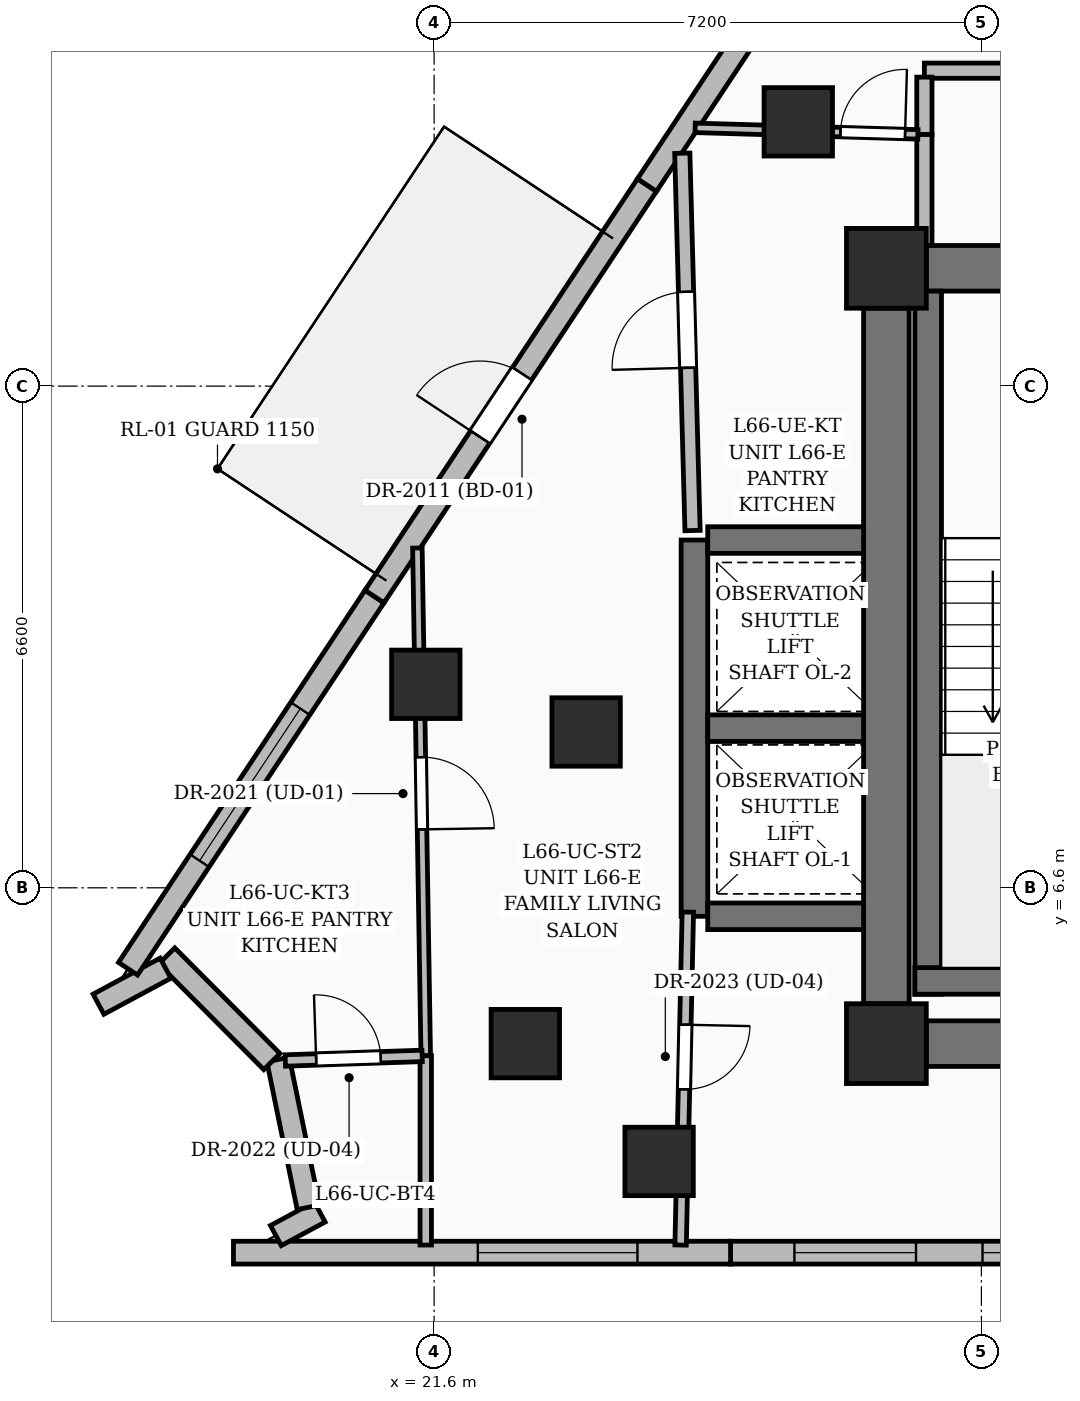
"""IFC4 building model, lengths in metres.
Left out: names, types, materials, properties, quantities, classifications, styles, units other than length and angle.
Written with IfcOpenShell. Run it as: python <this file> out.ifc"""

import sys

from ifc_helpers import new_model, si_unit, direction, frame, frame_2d, origin, origin_2d, place, context, subcontext, project, spatial, rectangle, extrude, element, fill, save


model = new_model("IFC4")
c1 = context("Model", 3, precision=1e-05, world=origin(), true_north=direction((0.0, 1.0)))
c2 = subcontext(c1, "Body", "Model", "MODEL_VIEW")
j1 = project(units=[si_unit("LENGTHUNIT", "METRE"), si_unit("PLANEANGLEUNIT", "RADIAN")], contexts=[c1])
p1 = place(None, origin())
s1 = spatial("IfcSite", under=j1, at=p1, CompositionType="ELEMENT")
p2 = place(p1, origin())
s2 = spatial("IfcBuilding", under=s1, at=p2, CompositionType="ELEMENT")
p3 = place(p2, frame((0.0, 0.0, 255.75)))
s3 = spatial("IfcBuildingStorey", under=s2, at=p3, CompositionType="ELEMENT", Elevation=255.75)
for number, where, z_axis, x_axis in (
    (1, (27.55, 4.55, 0.0), (0.0, 0.0, 1.0), (1.0, 0.0, 0.0)),
    (2, (27.55, 14.75, 0.0), (0.0, 0.0, 1.0), (1.0, 0.0, 0.0)),
):
    element("IfcColumn", number, at=place(p3, frame(where, z_axis=z_axis, x_axis=x_axis)), inside=s3, PredefinedType="COLUMN", context=c2, shape_type="SweptSolid", body=[
        extrude(rectangle(XDim=1.05, YDim=1.05, at=origin_2d()), origin(), (0.0, 0.0, 1.0), 3.75),
    ])
for number, where, z_axis, x_axis in (
    (3, (22.8, 4.55, 0.0), (0.0, 0.0, 1.0), (1.0, 0.0, 0.0)),
    (4, (23.6, 8.65, 0.0), (0.0, 0.0, 1.0), (1.0, 0.0, 0.0)),
):
    element("IfcColumn", number, at=place(p3, frame(where, z_axis=z_axis, x_axis=x_axis)), inside=s3, PredefinedType="COLUMN", context=c2, shape_type="SweptSolid", body=[
        extrude(rectangle(XDim=0.9, YDim=0.9, at=origin_2d()), origin(), (0.0, 0.0, 1.0), 3.75),
    ])
p4 = place(p3, frame((28.075, 4.55, 0.0), z_axis=(0.0, 0.0, 1.0), x_axis=(1.0, 0.0, 0.0)))
e5 = element("IfcWall", 5, at=p4, inside=s3, PredefinedType="SHEAR", context=c2, shape_type="SweptSolid", body=[
    extrude(rectangle(XDim=6.55, YDim=0.6, at=frame_2d((3.275, 0.0))), origin(), (0.0, 0.0, 1.0), 3.75),
])
p5 = place(p3, frame((28.075, 14.75, 0.0), z_axis=(0.0, 0.0, 1.0), x_axis=(1.0, 0.0, 0.0)))
e6 = element("IfcWall", 6, at=p5, inside=s3, PredefinedType="SHEAR", context=c2, shape_type="SweptSolid", body=[
    extrude(rectangle(XDim=6.55, YDim=0.6, at=frame_2d((3.275, 0.0))), origin(), (0.0, 0.0, 1.0), 3.75),
])
p6 = place(p5, frame((1.1, 0.0, 0.0)))
e7 = element("IfcOpeningElement", 7, at=p6, cuts=e6, PredefinedType="OPENING", context=c2, shape_type="SweptSolid", body=[
    extrude(rectangle(XDim=1.05, YDim=2.15, at=frame_2d((0.525, 1.075))), frame((0.0, 0.31, 0.0), z_axis=(0.0, -1.0, 0.0), x_axis=(1.0, 0.0, 0.0)), (0.0, 0.0, 1.0), 0.62),
])
p7 = place(p5, frame((4.95, 0.0, 0.0)))
e8 = element("IfcOpeningElement", 8, at=p7, cuts=e6, PredefinedType="OPENING", context=c2, shape_type="SweptSolid", body=[
    extrude(rectangle(XDim=0.95, YDim=2.15, at=frame_2d((0.475, 1.075))), frame((0.0, 0.31, 0.0), z_axis=(0.0, -1.0, 0.0), x_axis=(1.0, 0.0, 0.0)), (0.0, 0.0, 1.0), 0.62),
])
p8 = place(p3, frame((27.55, 5.075, 0.0), z_axis=(0.0, 0.0, 1.0), x_axis=(0.0, 1.0, 0.0)))
e9 = element("IfcWall", 9, at=p8, inside=s3, PredefinedType="SHEAR", context=c2, shape_type="SweptSolid", body=[
    extrude(rectangle(XDim=9.15, YDim=0.6, at=frame_2d((4.575, 0.0))), origin(), (0.0, 0.0, 1.0), 3.75),
])
p9 = place(p3, frame((28.1, 5.2, 0.0), z_axis=(0.0, 0.0, 1.0), x_axis=(0.0, 1.0, 0.0)))
e10 = element("IfcWall", 10, at=p9, inside=s3, PredefinedType="SOLIDWALL", context=c2, shape_type="SweptSolid", body=[
    extrude(rectangle(XDim=9.25, YDim=0.35, at=frame_2d((4.625, 0.0))), origin(), (0.0, 0.0, 1.0), 3.75),
])
p10 = place(p3, frame((27.925, 5.375, 0.0), z_axis=(0.0, 0.0, 1.0), x_axis=(1.0, 0.0, 0.0)))
e11 = element("IfcWall", 11, at=p10, inside=s3, PredefinedType="SOLIDWALL", context=c2, shape_type="SweptSolid", body=[
    extrude(rectangle(XDim=3.55, YDim=0.35, at=frame_2d((1.775, 0.0))), origin(), (0.0, 0.0, 1.0), 3.75),
])
p11 = place(p3, frame((25.025, 6.225, 0.0), z_axis=(0.0, 0.0, 1.0), x_axis=(0.0, 1.0, 0.0)))
e12 = element("IfcWall", 12, at=p11, inside=s3, PredefinedType="SOLIDWALL", context=c2, shape_type="SweptSolid", body=[
    extrude(rectangle(XDim=4.95, YDim=0.35, at=frame_2d((2.475, 0.0))), origin(), (0.0, 0.0, 1.0), 3.75),
])
for number, where, z_axis, x_axis in (
    (13, (25.2, 6.225, 0.0), (0.0, 0.0, 1.0), (1.0, 0.0, 0.0)),
    (14, (25.2, 8.7, 0.0), (0.0, 0.0, 1.0), (1.0, 0.0, 0.0)),
    (15, (25.2, 11.175, 0.0), (0.0, 0.0, 1.0), (1.0, 0.0, 0.0)),
):
    element("IfcWall", number, at=place(p3, frame(where, z_axis=z_axis, x_axis=x_axis)), inside=s3, PredefinedType="SOLIDWALL", context=c2, shape_type="SweptSolid", body=[
        extrude(rectangle(XDim=2.05, YDim=0.35, at=frame_2d((1.025, 0.0))), origin(), (0.0, 0.0, 1.0), 3.75),
    ])
for number, where, z_axis, x_axis in (
    (16, (24.56, 3.0, 0.0), (0.0, 0.0, 1.0), (1.0, 0.0, 0.0)),
    (17, (26.391, 16.677, 0.0), (0.0, 0.0, 1.0), (1.0, 0.0, 0.0)),
    (18, (21.491, 9.277, 0.0), (0.0, 0.0, 1.0), (1.0, 0.0, 0.0)),
):
    element("IfcColumn", number, at=place(p3, frame(where, z_axis=z_axis, x_axis=x_axis)), inside=s3, PredefinedType="COLUMN", context=c2, shape_type="SweptSolid", body=[
        extrude(rectangle(XDim=0.9, YDim=0.9, at=origin_2d()), origin(), (0.0, 0.0, 1.0), 3.75),
    ])
p12 = place(p3, frame((31.76, 1.8, 0.0), z_axis=(0.0, 0.0, 1.0), x_axis=(-1.0, 0.0, 0.0)))
e19 = element("IfcWall", 19, at=p12, inside=s3, PredefinedType="SOLIDWALL", context=c2, shape_type="SweptSolid", body=[
    extrude(rectangle(XDim=6.26, YDim=0.3, at=frame_2d((3.13, 0.0))), origin(), (0.0, 0.0, 1.0), 3.5),
])
p13 = place(p12, frame((0.545, 0.0, 0.6)))
e20 = element("IfcOpeningElement", 20, at=p13, cuts=e19, PredefinedType="OPENING", context=c2, shape_type="SweptSolid", body=[
    extrude(rectangle(XDim=2.4, YDim=2.1, at=frame_2d((1.2, 1.05))), frame((0.0, 0.16, 0.0), z_axis=(0.0, -1.0, 0.0), x_axis=(1.0, 0.0, 0.0)), (0.0, 0.0, 1.0), 0.32),
])
p14 = place(p12, frame((3.82, 0.0, 0.55)))
e21 = element("IfcOpeningElement", 21, at=p14, cuts=e19, PredefinedType="OPENING", context=c2, shape_type="SweptSolid", body=[
    extrude(rectangle(XDim=1.6, YDim=2.2, at=frame_2d((0.8, 1.1))), frame((0.0, 0.16, 0.0), z_axis=(0.0, -1.0, 0.0), x_axis=(1.0, 0.0, 0.0)), (0.0, 0.0, 1.0), 0.32),
])
p15 = place(p3, frame((25.5, 1.8, 0.0), z_axis=(0.0, 0.0, 1.0), x_axis=(-1.0, 0.0, 0.0)))
e22 = element("IfcWall", 22, at=p15, inside=s3, PredefinedType="SOLIDWALL", context=c2, shape_type="SweptSolid", body=[
    extrude(rectangle(XDim=6.54, YDim=0.3, at=frame_2d((3.27, 0.0))), origin(), (0.0, 0.0, 1.0), 3.5),
])
p16 = place(p15, frame((1.225, 0.0, 0.55)))
e23 = element("IfcOpeningElement", 23, at=p16, cuts=e22, PredefinedType="OPENING", context=c2, shape_type="SweptSolid", body=[
    extrude(rectangle(XDim=2.1, YDim=2.4, at=frame_2d((1.05, 1.2))), frame((0.0, 0.16, 0.0), z_axis=(0.0, -1.0, 0.0), x_axis=(1.0, 0.0, 0.0)), (0.0, 0.0, 1.0), 0.32),
])
p17 = place(p3, frame((19.518, 2.025, 0.0), z_axis=(0.0, 0.0, 1.0), x_axis=(0.8806864219, 0.47369972164, 0.0)))
e24 = element("IfcWall", 24, at=p17, inside=s3, PredefinedType="SOLIDWALL", context=c2, shape_type="SweptSolid", body=[
    extrude(rectangle(XDim=0.655, YDim=0.3, at=frame_2d((0.328, 0.0))), origin(), (0.0, 0.0, 1.0), 3.5),
])
p18 = place(p3, frame((19.946, 2.396, 0.0), z_axis=(0.0, 0.0, 1.0), x_axis=(-0.200962300898, 0.979598975917, 0.0)))
e25 = element("IfcWall", 25, at=p18, inside=s3, PredefinedType="SOLIDWALL", context=c2, shape_type="SweptSolid", body=[
    extrude(rectangle(XDim=1.985, YDim=0.3, at=frame_2d((0.993, 0.0))), origin(), (0.0, 0.0, 1.0), 3.5),
])
p19 = place(p3, frame((19.466, 4.314, 0.0), z_axis=(0.0, 0.0, 1.0), x_axis=(-0.705548527825, 0.708661608163, 0.0)))
e26 = element("IfcWall", 26, at=p19, inside=s3, PredefinedType="SOLIDWALL", context=c2, shape_type="SweptSolid", body=[
    extrude(rectangle(XDim=1.961, YDim=0.3, at=frame_2d((0.98, 0.0))), origin(), (0.0, 0.0, 1.0), 3.5),
])
p20 = place(p3, frame((18.066, 5.542, 0.0), z_axis=(0.0, 0.0, 1.0), x_axis=(-0.880815496191, -0.473459672696, 0.0)))
e27 = element("IfcWall", 27, at=p20, inside=s3, PredefinedType="SOLIDWALL", context=c2, shape_type="SweptSolid", body=[
    extrude(rectangle(XDim=1.001, YDim=0.3, at=frame_2d((0.5, 0.0))), origin(), (0.0, 0.0, 1.0), 3.5),
])
p21 = place(p3, frame((17.573, 5.535, 0.0), z_axis=(0.0, 0.0, 1.0), x_axis=(0.552126632123, 0.833760266564, 0.0)))
e28 = element("IfcWall", 28, at=p21, inside=s3, PredefinedType="SOLIDWALL", context=c2, shape_type="SweptSolid", body=[
    extrude(rectangle(XDim=5.873, YDim=0.3, at=frame_2d((2.937, 0.0))), origin(), (0.0, 0.0, 1.0), 3.5),
])
p22 = place(p21, frame((1.705, 0.0, 0.6)))
e29 = element("IfcOpeningElement", 29, at=p22, cuts=e28, PredefinedType="OPENING", context=c2, shape_type="SweptSolid", body=[
    extrude(rectangle(XDim=2.4, YDim=2.1, at=frame_2d((1.2, 1.05))), frame((0.0, 0.16, 0.0), z_axis=(0.0, -1.0, 0.0), x_axis=(1.0, 0.0, 0.0)), (0.0, 0.0, 1.0), 0.32),
])
p23 = place(p3, frame((20.816, 10.432, 0.0), z_axis=(0.0, 0.0, 1.0), x_axis=(0.552120304718, 0.833764456617, 0.0)))
e30 = element("IfcWall", 30, at=p23, inside=s3, PredefinedType="SOLIDWALL", context=c2, shape_type="SweptSolid", body=[
    extrude(rectangle(XDim=6.493, YDim=0.3, at=frame_2d((3.246, 0.0))), origin(), (0.0, 0.0, 1.0), 3.5),
])
p24 = place(p23, frame((2.517, 0.0, 0.0)))
e31 = element("IfcOpeningElement", 31, at=p24, cuts=e30, PredefinedType="OPENING", context=c2, shape_type="SweptSolid", body=[
    extrude(rectangle(XDim=1.0, YDim=2.2, at=frame_2d((0.5, 1.1))), frame((0.0, 0.16, 0.0), z_axis=(0.0, -1.0, 0.0), x_axis=(1.0, 0.0, 0.0)), (0.0, 0.0, 1.0), 0.32),
])
p25 = place(p3, frame((24.4, 15.845, 0.0), z_axis=(0.0, 0.0, 1.0), x_axis=(0.552142344765, 0.83374986124, 0.0)))
e32 = element("IfcWall", 32, at=p25, inside=s3, PredefinedType="SOLIDWALL", context=c2, shape_type="SweptSolid", body=[
    extrude(rectangle(XDim=6.218, YDim=0.3, at=frame_2d((3.109, 0.0))), origin(), (0.0, 0.0, 1.0), 3.5),
])
p26 = place(p25, frame((2.75, 0.0, 0.6)))
e33 = element("IfcOpeningElement", 33, at=p26, cuts=e32, PredefinedType="OPENING", context=c2, shape_type="SweptSolid", body=[
    extrude(rectangle(XDim=1.8, YDim=2.1, at=frame_2d((0.9, 1.05))), frame((0.0, 0.16, 0.0), z_axis=(0.0, -1.0, 0.0), x_axis=(1.0, 0.0, 0.0)), (0.0, 0.0, 1.0), 0.32),
])
p27 = place(p3, frame((33.75, 17.35, 0.0), z_axis=(0.0, 0.0, 1.0), x_axis=(-1.0, 0.0, 0.0)))
e34 = element("IfcWall", 34, at=p27, inside=s3, PredefinedType="PARTITIONING", context=c2, shape_type="SweptSolid", body=[
    extrude(rectangle(XDim=5.7, YDim=0.2, at=frame_2d((2.85, 0.0))), origin(), (0.0, 0.0, 1.0), 3.5),
])
p28 = place(p27, frame((2.29, 0.0, 0.0)))
e35 = element("IfcOpeningElement", 35, at=p28, cuts=e34, PredefinedType="OPENING", context=c2, shape_type="SweptSolid", body=[
    extrude(rectangle(XDim=1.0, YDim=2.2, at=frame_2d((0.5, 1.1))), frame((0.0, 0.11, 0.0), z_axis=(0.0, -1.0, 0.0), x_axis=(1.0, 0.0, 0.0)), (0.0, 0.0, 1.0), 0.22),
])
p29 = place(p3, frame((28.05, 17.265, 0.0), z_axis=(0.0, 0.0, 1.0), x_axis=(0.0, -1.0, 0.0)))
e36 = element("IfcWall", 36, at=p29, inside=s3, PredefinedType="PARTITIONING", context=c2, shape_type="SweptSolid", body=[
    extrude(rectangle(XDim=0.755, YDim=0.2, at=frame_2d((0.377, 0.0))), origin(), (0.0, 0.0, 1.0), 3.5),
])
p30 = place(p3, frame((28.05, 16.51, 0.0), z_axis=(0.0, 0.0, 1.0), x_axis=(0.0, -1.0, 0.0)))
e37 = element("IfcWall", 37, at=p30, inside=s3, PredefinedType="PARTITIONING", context=c2, shape_type="SweptSolid", body=[
    extrude(rectangle(XDim=1.46, YDim=0.2, at=frame_2d((0.73, 0.0))), origin(), (0.0, 0.0, 1.0), 3.5),
])
p31 = place(p3, frame((21.38, 11.07, 0.0), z_axis=(0.0, 0.0, 1.0), x_axis=(0.016480474698, -0.999864187754, 0.0)))
e38 = element("IfcWall", 38, at=p31, inside=s3, PredefinedType="PARTITIONING", context=c2, shape_type="SweptSolid", body=[
    extrude(rectangle(XDim=6.681, YDim=0.125, at=frame_2d((3.341, 0.0))), origin(), (0.0, 0.0, 1.0), 3.5),
])
p32 = place(p31, frame((2.752, 0.0, 0.0)))
e39 = element("IfcOpeningElement", 39, at=p32, cuts=e38, PredefinedType="OPENING", context=c2, shape_type="SweptSolid", body=[
    extrude(rectangle(XDim=0.95, YDim=2.2, at=frame_2d((0.475, 1.1))), frame((0.0, 0.072, 0.0), z_axis=(0.0, -1.0, 0.0), x_axis=(1.0, 0.0, 0.0)), (0.0, 0.0, 1.0), 0.145),
])
p33 = place(p3, frame((21.49, 4.39, 0.0), z_axis=(0.0, 0.0, 1.0), x_axis=(0.0, -1.0, 0.0)))
e40 = element("IfcWall", 40, at=p33, inside=s3, PredefinedType="PARTITIONING", context=c2, shape_type="SweptSolid", body=[
    extrude(rectangle(XDim=2.49, YDim=0.15, at=frame_2d((1.245, 0.0))), origin(), (0.0, 0.0, 1.0), 3.5),
])
p34 = place(p3, frame((25.0, 11.3, 0.0), z_axis=(0.0, 0.0, 1.0), x_axis=(-0.027188450233, 0.999630325757, 0.0)))
e41 = element("IfcWall", 41, at=p34, inside=s3, PredefinedType="PARTITIONING", context=c2, shape_type="SweptSolid", body=[
    extrude(rectangle(XDim=4.966, YDim=0.2, at=frame_2d((2.483, 0.0))), origin(), (0.0, 0.0, 1.0), 2.82),
])
p35 = place(p34, frame((2.142, 0.0, 0.0)))
e42 = element("IfcOpeningElement", 42, at=p35, cuts=e41, PredefinedType="OPENING", context=c2, shape_type="SweptSolid", body=[
    extrude(rectangle(XDim=1.0, YDim=2.2, at=frame_2d((0.5, 1.1))), frame((0.0, 0.11, 0.0), z_axis=(0.0, -1.0, 0.0), x_axis=(1.0, 0.0, 0.0)), (0.0, 0.0, 1.0), 0.22),
])
p36 = place(p3, frame((19.642, 4.328, 0.0), z_axis=(0.0, 0.0, 1.0), x_axis=(0.999434934398, 0.033612674767, 0.0)))
e43 = element("IfcWall", 43, at=p36, inside=s3, PredefinedType="PARTITIONING", context=c2, shape_type="SweptSolid", body=[
    extrude(rectangle(XDim=1.801, YDim=0.15, at=frame_2d((0.901, 0.0))), origin(), (0.0, 0.0, 1.0), 3.5),
])
p37 = place(p36, frame((0.406, 0.0, 0.0)))
e44 = element("IfcOpeningElement", 44, at=p37, cuts=e43, PredefinedType="OPENING", context=c2, shape_type="SweptSolid", body=[
    extrude(rectangle(XDim=0.85, YDim=2.1, at=frame_2d((0.425, 1.05))), frame((0.0, 0.085, 0.0), z_axis=(0.0, -1.0, 0.0), x_axis=(1.0, 0.0, 0.0)), (0.0, 0.0, 1.0), 0.17),
])
p38 = place(p3, frame((24.938, 6.28, 0.0), z_axis=(0.0, 0.0, 1.0), x_axis=(-0.021677085696, -0.999765024371, 0.0)))
e45 = element("IfcWall", 45, at=p38, inside=s3, PredefinedType="PARTITIONING", context=c2, shape_type="SweptSolid", body=[
    extrude(rectangle(XDim=4.381, YDim=0.15, at=frame_2d((2.19, 0.0))), origin(), (0.0, 0.0, 1.0), 2.685),
])
p39 = place(p38, frame((1.481, 0.0, 0.0)))
e46 = element("IfcOpeningElement", 46, at=p39, cuts=e45, PredefinedType="OPENING", context=c2, shape_type="SweptSolid", body=[
    extrude(rectangle(XDim=0.85, YDim=2.1, at=frame_2d((0.425, 1.05))), frame((0.0, 0.085, 0.0), z_axis=(0.0, -1.0, 0.0), x_axis=(1.0, 0.0, 0.0)), (0.0, 0.0, 1.0), 0.17),
])
p40 = place(p3, frame((25.034, 16.598, 0.0), z_axis=(0.0, 0.0, 1.0), x_axis=(0.999570484561, -0.029306081173, 0.0)))
e47 = element("IfcWall", 47, at=p40, inside=s3, PredefinedType="PARTITIONING", context=c2, shape_type="SweptSolid", body=[
    extrude(rectangle(XDim=2.932, YDim=0.125, at=frame_2d((1.466, 0.0))), origin(), (0.0, 0.0, 1.0), 3.5),
])
p41 = place(p40, frame((1.913, 0.0, 0.0)))
e48 = element("IfcOpeningElement", 48, at=p41, cuts=e47, PredefinedType="OPENING", context=c2, shape_type="SweptSolid", body=[
    extrude(rectangle(XDim=0.85, YDim=2.1, at=frame_2d((0.425, 1.05))), frame((0.0, 0.072, 0.0), z_axis=(0.0, -1.0, 0.0), x_axis=(1.0, 0.0, 0.0)), (0.0, 0.0, 1.0), 0.145),
])
p42 = place(p13, origin())
e49 = element("IfcWindow", 49, at=p42, inside=s3, PartitioningType="SINGLE_PANEL", PredefinedType="WINDOW", context=c2, shape_type="SweptSolid", body=[
    extrude(rectangle(XDim=2.4, YDim=2.1, at=frame_2d((1.2, 1.05))), frame((0.0, 0.03, 0.0), z_axis=(0.0, -1.0, 0.0), x_axis=(1.0, 0.0, 0.0)), (0.0, 0.0, 1.0), 0.06),
])
fill(e20, e49)
p43 = place(p14, origin())
e50 = element("IfcWindow", 50, at=p43, inside=s3, PartitioningType="SINGLE_PANEL", PredefinedType="WINDOW", context=c2, shape_type="SweptSolid", body=[
    extrude(rectangle(XDim=1.6, YDim=2.2, at=frame_2d((0.8, 1.1))), frame((0.0, 0.03, 0.0), z_axis=(0.0, -1.0, 0.0), x_axis=(1.0, 0.0, 0.0)), (0.0, 0.0, 1.0), 0.06),
])
fill(e21, e50)
p44 = place(p16, origin())
e51 = element("IfcWindow", 51, at=p44, inside=s3, PartitioningType="SINGLE_PANEL", PredefinedType="WINDOW", context=c2, shape_type="SweptSolid", body=[
    extrude(rectangle(XDim=2.1, YDim=2.4, at=frame_2d((1.05, 1.2))), frame((0.0, 0.03, 0.0), z_axis=(0.0, -1.0, 0.0), x_axis=(1.0, 0.0, 0.0)), (0.0, 0.0, 1.0), 0.06),
])
fill(e23, e51)
p45 = place(p22, origin())
e52 = element("IfcWindow", 52, at=p45, inside=s3, PartitioningType="SINGLE_PANEL", PredefinedType="WINDOW", context=c2, shape_type="SweptSolid", body=[
    extrude(rectangle(XDim=2.4, YDim=2.1, at=frame_2d((1.2, 1.05))), frame((0.0, 0.03, 0.0), z_axis=(0.0, -1.0, 0.0), x_axis=(1.0, 0.0, 0.0)), (0.0, 0.0, 1.0), 0.06),
])
fill(e29, e52)
p46 = place(p24, origin())
e53 = element("IfcDoor", 53, at=p46, inside=s3, OperationType="SINGLE_SWING_LEFT", PredefinedType="DOOR", context=c2, shape_type="SweptSolid", body=[
    extrude(rectangle(XDim=1.0, YDim=2.2, at=frame_2d((0.5, 1.1))), frame((0.0, 0.025, 0.0), z_axis=(0.0, -1.0, 0.0), x_axis=(1.0, 0.0, 0.0)), (0.0, 0.0, 1.0), 0.05),
])
fill(e31, e53)
p47 = place(p32, origin())
e54 = element("IfcDoor", 54, at=p47, inside=s3, OperationType="SINGLE_SWING_RIGHT", PredefinedType="DOOR", context=c2, shape_type="SweptSolid", body=[
    extrude(rectangle(XDim=0.95, YDim=2.2, at=frame_2d((0.475, 1.1))), frame((0.0, 0.025, 0.0), z_axis=(0.0, -1.0, 0.0), x_axis=(1.0, 0.0, 0.0)), (0.0, 0.0, 1.0), 0.05),
])
fill(e39, e54)
p48 = place(p37, origin())
e55 = element("IfcDoor", 55, at=p48, inside=s3, OperationType="SINGLE_SWING_LEFT", PredefinedType="DOOR", context=c2, shape_type="SweptSolid", body=[
    extrude(rectangle(XDim=0.85, YDim=2.1, at=frame_2d((0.425, 1.05))), frame((0.0, 0.025, 0.0), z_axis=(0.0, -1.0, 0.0), x_axis=(1.0, 0.0, 0.0)), (0.0, 0.0, 1.0), 0.05),
])
fill(e44, e55)
p49 = place(p39, origin())
e56 = element("IfcDoor", 56, at=p49, inside=s3, OperationType="SINGLE_SWING_LEFT", PredefinedType="DOOR", context=c2, shape_type="SweptSolid", body=[
    extrude(rectangle(XDim=0.85, YDim=2.1, at=frame_2d((0.425, 1.05))), frame((0.0, 0.025, 0.0), z_axis=(0.0, -1.0, 0.0), x_axis=(1.0, 0.0, 0.0)), (0.0, 0.0, 1.0), 0.05),
])
fill(e46, e56)
p50 = place(p41, origin())
e57 = element("IfcDoor", 57, at=p50, inside=s3, OperationType="SINGLE_SWING_RIGHT", PredefinedType="DOOR", context=c2, shape_type="SweptSolid", body=[
    extrude(rectangle(XDim=0.85, YDim=2.1, at=frame_2d((0.425, 1.05))), frame((0.0, 0.025, 0.0), z_axis=(0.0, -1.0, 0.0), x_axis=(1.0, 0.0, 0.0)), (0.0, 0.0, 1.0), 0.05),
])
fill(e48, e57)
p51 = place(p35, origin())
e58 = element("IfcDoor", 58, at=p51, inside=s3, OperationType="SINGLE_SWING_LEFT", PredefinedType="DOOR", context=c2, shape_type="SweptSolid", body=[
    extrude(rectangle(XDim=1.0, YDim=2.2, at=frame_2d((0.5, 1.1))), frame((0.0, 0.025, 0.0), z_axis=(0.0, -1.0, 0.0), x_axis=(1.0, 0.0, 0.0)), (0.0, 0.0, 1.0), 0.05),
])
fill(e42, e58)
save(model, sys.argv[1])
